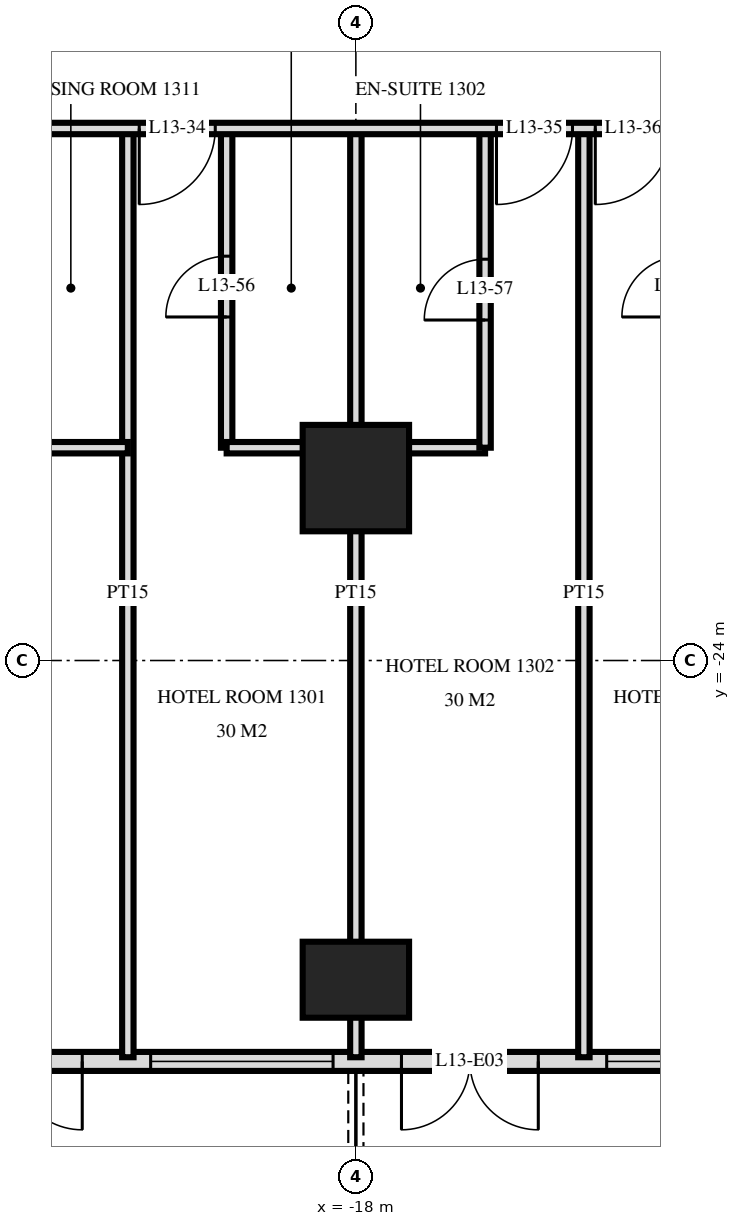
"""IFC4 building model, lengths in metres.
Left out: names, types, materials, properties, quantities, classifications, styles, units other than length and angle.
Written with IfcOpenShell. Run it as: python <this file> out.ifc"""

import sys

from ifc_helpers import new_model, si_unit, direction, frame, frame_2d, origin, origin_2d, place, context, subcontext, project, spatial, rectangle, extrude, element, fill, save


model = new_model("IFC4")
c1 = context("Model", 3, precision=1e-05, world=origin(), true_north=direction((0.0, 1.0)))
c2 = subcontext(c1, "Body", "Model", "MODEL_VIEW")
j1 = project(units=[si_unit("LENGTHUNIT", "METRE"), si_unit("PLANEANGLEUNIT", "RADIAN")], contexts=[c1])
p1 = place(None, origin())
s1 = spatial("IfcSite", under=j1, at=p1, CompositionType="ELEMENT")
p2 = place(p1, origin())
s2 = spatial("IfcBuilding", under=s1, at=p2, CompositionType="ELEMENT")
p3 = place(p2, frame((0.0, 0.0, 56.4)))
s3 = spatial("IfcBuildingStorey", under=s2, at=p3, CompositionType="ELEMENT", Elevation=56.4)
p4 = place(p3, frame((-18.0, -28.2, 0.0), z_axis=(0.0, 0.0, 1.0), x_axis=(1.0, 0.0, 0.0)))
e1 = element("IfcColumn", 1, at=p4, inside=s3, PredefinedType="COLUMN", context=c2, shape_type="SweptSolid", body=[
    extrude(rectangle(XDim=1.4, YDim=1.0, at=origin_2d()), origin(), (0.0, 0.0, 1.0), 3.6),
])
p5 = place(p3, frame((-18.0, -21.6, 0.0), z_axis=(0.0, 0.0, 1.0), x_axis=(1.0, 0.0, 0.0)))
e2 = element("IfcColumn", 2, at=p5, inside=s3, PredefinedType="COLUMN", context=c2, shape_type="SweptSolid", body=[
    extrude(rectangle(XDim=1.4, YDim=1.4, at=origin_2d()), origin(), (0.0, 0.0, 1.0), 3.6),
])
p6 = place(p3, frame((-28.775, -29.275, 0.0), z_axis=(0.0, 0.0, 1.0), x_axis=(1.0, 0.0, 0.0)))
e3 = element("IfcWall", 3, at=p6, inside=s3, PredefinedType="SOLIDWALL", context=c2, shape_type="SweptSolid", body=[
    extrude(rectangle(XDim=57.551, YDim=0.25, at=frame_2d((28.775, 0.0))), origin(), (0.0, 0.0, 1.0), 3.32),
])
p7 = place(p6, frame((0.575, 0.0, 0.0)))
e4 = element("IfcOpeningElement", 4, at=p7, cuts=e3, PredefinedType="OPENING", context=c2, shape_type="SweptSolid", body=[
    extrude(rectangle(XDim=1.8, YDim=2.4, at=frame_2d((0.9, 1.2))), frame((0.0, 0.135, 0.0), z_axis=(0.0, -1.0, 0.0), x_axis=(1.0, 0.0, 0.0)), (0.0, 0.0, 1.0), 0.27),
])
p8 = place(p6, frame((5.375, 0.0, 0.0)))
e5 = element("IfcOpeningElement", 5, at=p8, cuts=e3, PredefinedType="OPENING", context=c2, shape_type="SweptSolid", body=[
    extrude(rectangle(XDim=1.8, YDim=2.4, at=frame_2d((0.9, 1.2))), frame((0.0, 0.135, 0.0), z_axis=(0.0, -1.0, 0.0), x_axis=(1.0, 0.0, 0.0)), (0.0, 0.0, 1.0), 0.27),
])
p9 = place(p6, frame((8.075, 0.0, 0.3)))
e6 = element("IfcOpeningElement", 6, at=p9, cuts=e3, PredefinedType="OPENING", context=c2, shape_type="SweptSolid", body=[
    extrude(rectangle(XDim=2.4, YDim=2.1, at=frame_2d((1.2, 1.05))), frame((0.0, 0.135, 0.0), z_axis=(0.0, -1.0, 0.0), x_axis=(1.0, 0.0, 0.0)), (0.0, 0.0, 1.0), 0.27),
])
p10 = place(p6, frame((11.375, 0.0, 0.0)))
e7 = element("IfcOpeningElement", 7, at=p10, cuts=e3, PredefinedType="OPENING", context=c2, shape_type="SweptSolid", body=[
    extrude(rectangle(XDim=1.8, YDim=2.4, at=frame_2d((0.9, 1.2))), frame((0.0, 0.135, 0.0), z_axis=(0.0, -1.0, 0.0), x_axis=(1.0, 0.0, 0.0)), (0.0, 0.0, 1.0), 0.27),
])
p11 = place(p6, frame((14.075, 0.0, 0.3)))
e8 = element("IfcOpeningElement", 8, at=p11, cuts=e3, PredefinedType="OPENING", context=c2, shape_type="SweptSolid", body=[
    extrude(rectangle(XDim=2.4, YDim=2.1, at=frame_2d((1.2, 1.05))), frame((0.0, 0.135, 0.0), z_axis=(0.0, -1.0, 0.0), x_axis=(1.0, 0.0, 0.0)), (0.0, 0.0, 1.0), 0.27),
])
p12 = place(p6, frame((17.375, 0.0, 0.0)))
e9 = element("IfcOpeningElement", 9, at=p12, cuts=e3, PredefinedType="OPENING", context=c2, shape_type="SweptSolid", body=[
    extrude(rectangle(XDim=1.8, YDim=2.4, at=frame_2d((0.9, 1.2))), frame((0.0, 0.135, 0.0), z_axis=(0.0, -1.0, 0.0), x_axis=(1.0, 0.0, 0.0)), (0.0, 0.0, 1.0), 0.27),
])
p13 = place(p6, frame((20.075, 0.0, 0.3)))
e10 = element("IfcOpeningElement", 10, at=p13, cuts=e3, PredefinedType="OPENING", context=c2, shape_type="SweptSolid", body=[
    extrude(rectangle(XDim=2.4, YDim=2.1, at=frame_2d((1.2, 1.05))), frame((0.0, 0.135, 0.0), z_axis=(0.0, -1.0, 0.0), x_axis=(1.0, 0.0, 0.0)), (0.0, 0.0, 1.0), 0.27),
])
p14 = place(p6, frame((23.075, 0.0, 0.3)))
e11 = element("IfcOpeningElement", 11, at=p14, cuts=e3, PredefinedType="OPENING", context=c2, shape_type="SweptSolid", body=[
    extrude(rectangle(XDim=2.4, YDim=2.1, at=frame_2d((1.2, 1.05))), frame((0.0, 0.135, 0.0), z_axis=(0.0, -1.0, 0.0), x_axis=(1.0, 0.0, 0.0)), (0.0, 0.0, 1.0), 0.27),
])
p15 = place(p6, frame((26.375, 0.0, 0.0)))
e12 = element("IfcOpeningElement", 12, at=p15, cuts=e3, PredefinedType="OPENING", context=c2, shape_type="SweptSolid", body=[
    extrude(rectangle(XDim=1.8, YDim=2.4, at=frame_2d((0.9, 1.2))), frame((0.0, 0.135, 0.0), z_axis=(0.0, -1.0, 0.0), x_axis=(1.0, 0.0, 0.0)), (0.0, 0.0, 1.0), 0.27),
])
p16 = place(p6, frame((29.075, 0.0, 0.3)))
e13 = element("IfcOpeningElement", 13, at=p16, cuts=e3, PredefinedType="OPENING", context=c2, shape_type="SweptSolid", body=[
    extrude(rectangle(XDim=2.4, YDim=2.1, at=frame_2d((1.2, 1.05))), frame((0.0, 0.135, 0.0), z_axis=(0.0, -1.0, 0.0), x_axis=(1.0, 0.0, 0.0)), (0.0, 0.0, 1.0), 0.27),
])
p17 = place(p6, frame((32.375, 0.0, 0.0)))
e14 = element("IfcOpeningElement", 14, at=p17, cuts=e3, PredefinedType="OPENING", context=c2, shape_type="SweptSolid", body=[
    extrude(rectangle(XDim=1.8, YDim=2.4, at=frame_2d((0.9, 1.2))), frame((0.0, 0.135, 0.0), z_axis=(0.0, -1.0, 0.0), x_axis=(1.0, 0.0, 0.0)), (0.0, 0.0, 1.0), 0.27),
])
p18 = place(p6, frame((35.375, 0.0, 0.0)))
e15 = element("IfcOpeningElement", 15, at=p18, cuts=e3, PredefinedType="OPENING", context=c2, shape_type="SweptSolid", body=[
    extrude(rectangle(XDim=1.8, YDim=2.4, at=frame_2d((0.9, 1.2))), frame((0.0, 0.135, 0.0), z_axis=(0.0, -1.0, 0.0), x_axis=(1.0, 0.0, 0.0)), (0.0, 0.0, 1.0), 0.27),
])
p19 = place(p6, frame((38.075, 0.0, 0.3)))
e16 = element("IfcOpeningElement", 16, at=p19, cuts=e3, PredefinedType="OPENING", context=c2, shape_type="SweptSolid", body=[
    extrude(rectangle(XDim=2.4, YDim=2.1, at=frame_2d((1.2, 1.05))), frame((0.0, 0.135, 0.0), z_axis=(0.0, -1.0, 0.0), x_axis=(1.0, 0.0, 0.0)), (0.0, 0.0, 1.0), 0.27),
])
p20 = place(p6, frame((41.375, 0.0, 0.0)))
e17 = element("IfcOpeningElement", 17, at=p20, cuts=e3, PredefinedType="OPENING", context=c2, shape_type="SweptSolid", body=[
    extrude(rectangle(XDim=1.8, YDim=2.4, at=frame_2d((0.9, 1.2))), frame((0.0, 0.135, 0.0), z_axis=(0.0, -1.0, 0.0), x_axis=(1.0, 0.0, 0.0)), (0.0, 0.0, 1.0), 0.27),
])
p21 = place(p6, frame((44.075, 0.0, 0.3)))
e18 = element("IfcOpeningElement", 18, at=p21, cuts=e3, PredefinedType="OPENING", context=c2, shape_type="SweptSolid", body=[
    extrude(rectangle(XDim=2.4, YDim=2.1, at=frame_2d((1.2, 1.05))), frame((0.0, 0.135, 0.0), z_axis=(0.0, -1.0, 0.0), x_axis=(1.0, 0.0, 0.0)), (0.0, 0.0, 1.0), 0.27),
])
p22 = place(p6, frame((47.075, 0.0, 0.3)))
e19 = element("IfcOpeningElement", 19, at=p22, cuts=e3, PredefinedType="OPENING", context=c2, shape_type="SweptSolid", body=[
    extrude(rectangle(XDim=2.4, YDim=2.1, at=frame_2d((1.2, 1.05))), frame((0.0, 0.135, 0.0), z_axis=(0.0, -1.0, 0.0), x_axis=(1.0, 0.0, 0.0)), (0.0, 0.0, 1.0), 0.27),
])
p23 = place(p6, frame((50.375, 0.0, 0.0)))
e20 = element("IfcOpeningElement", 20, at=p23, cuts=e3, PredefinedType="OPENING", context=c2, shape_type="SweptSolid", body=[
    extrude(rectangle(XDim=1.8, YDim=2.4, at=frame_2d((0.9, 1.2))), frame((0.0, 0.135, 0.0), z_axis=(0.0, -1.0, 0.0), x_axis=(1.0, 0.0, 0.0)), (0.0, 0.0, 1.0), 0.27),
])
p24 = place(p6, frame((53.375, 0.0, 0.0)))
e21 = element("IfcOpeningElement", 21, at=p24, cuts=e3, PredefinedType="OPENING", context=c2, shape_type="SweptSolid", body=[
    extrude(rectangle(XDim=1.8, YDim=2.4, at=frame_2d((0.9, 1.2))), frame((0.0, 0.135, 0.0), z_axis=(0.0, -1.0, 0.0), x_axis=(1.0, 0.0, 0.0)), (0.0, 0.0, 1.0), 0.27),
])
p25 = place(p3, frame((-15.0, -29.22, 0.0), z_axis=(0.0, 0.0, 1.0), x_axis=(0.0, 1.0, 0.0)))
e22 = element("IfcWall", 22, at=p25, inside=s3, PredefinedType="PARTITIONING", context=c2, shape_type="SweptSolid", body=[
    extrude(rectangle(XDim=12.22, YDim=0.15, at=frame_2d((6.11, 0.0))), origin(), (0.0, 0.0, 1.0), 3.32),
])
p26 = place(p3, frame((-16.3, -21.2, 0.0), z_axis=(0.0, 0.0, 1.0), x_axis=(0.0, 1.0, 0.0)))
e23 = element("IfcWall", 23, at=p26, inside=s3, PredefinedType="PARTITIONING", context=c2, shape_type="SweptSolid", body=[
    extrude(rectangle(XDim=4.2, YDim=0.15, at=frame_2d((2.1, 0.0))), origin(), (0.0, 0.0, 1.0), 3.32),
])
p27 = place(p26, frame((1.68, 0.0, 0.0)))
e24 = element("IfcOpeningElement", 24, at=p27, cuts=e23, PredefinedType="OPENING", context=c2, shape_type="SweptSolid", body=[
    extrude(rectangle(XDim=0.8, YDim=2.1, at=frame_2d((0.4, 1.05))), frame((0.0, 0.085, 0.0), z_axis=(0.0, -1.0, 0.0), x_axis=(1.0, 0.0, 0.0)), (0.0, 0.0, 1.0), 0.17),
])
p28 = place(p3, frame((-18.0, -29.22, 0.0), z_axis=(0.0, 0.0, 1.0), x_axis=(0.0, 1.0, 0.0)))
e25 = element("IfcWall", 25, at=p28, inside=s3, PredefinedType="PARTITIONING", context=c2, shape_type="SweptSolid", body=[
    extrude(rectangle(XDim=12.22, YDim=0.15, at=frame_2d((6.11, 0.0))), origin(), (0.0, 0.0, 1.0), 3.32),
])
p29 = place(p3, frame((-19.7, -21.2, 0.0), z_axis=(0.0, 0.0, 1.0), x_axis=(0.0, 1.0, 0.0)))
e26 = element("IfcWall", 26, at=p29, inside=s3, PredefinedType="PARTITIONING", context=c2, shape_type="SweptSolid", body=[
    extrude(rectangle(XDim=4.2, YDim=0.15, at=frame_2d((2.1, 0.0))), origin(), (0.0, 0.0, 1.0), 3.32),
])
p30 = place(p29, frame((1.72, 0.0, 0.0)))
e27 = element("IfcOpeningElement", 27, at=p30, cuts=e26, PredefinedType="OPENING", context=c2, shape_type="SweptSolid", body=[
    extrude(rectangle(XDim=0.8, YDim=2.1, at=frame_2d((0.4, 1.05))), frame((0.0, 0.085, 0.0), z_axis=(0.0, -1.0, 0.0), x_axis=(1.0, 0.0, 0.0)), (0.0, 0.0, 1.0), 0.17),
])
p31 = place(p3, frame((-21.0, -29.22, 0.0), z_axis=(0.0, 0.0, 1.0), x_axis=(0.0, 1.0, 0.0)))
e28 = element("IfcWall", 28, at=p31, inside=s3, PredefinedType="PARTITIONING", context=c2, shape_type="SweptSolid", body=[
    extrude(rectangle(XDim=12.22, YDim=0.15, at=frame_2d((6.11, 0.0))), origin(), (0.0, 0.0, 1.0), 3.32),
])
p32 = place(p3, frame((-22.5, -21.2, 0.0), z_axis=(0.0, 0.0, 1.0), x_axis=(1.0, 0.0, 0.0)))
e29 = element("IfcWall", 29, at=p32, inside=s3, PredefinedType="PARTITIONING", context=c2, shape_type="SweptSolid", body=[
    extrude(rectangle(XDim=1.5, YDim=0.15, at=frame_2d((0.75, 0.0))), origin(), (0.0, 0.0, 1.0), 3.32),
])
p33 = place(p3, frame((-19.7, -21.2, 0.0), z_axis=(0.0, 0.0, 1.0), x_axis=(1.0, 0.0, 0.0)))
e30 = element("IfcWall", 30, at=p33, inside=s3, PredefinedType="PARTITIONING", context=c2, shape_type="SweptSolid", body=[
    extrude(rectangle(XDim=3.4, YDim=0.15, at=frame_2d((1.7, 0.0))), origin(), (0.0, 0.0, 1.0), 3.32),
])
p34 = place(p3, frame((-33.12, -17.0, 0.0), z_axis=(0.0, 0.0, 1.0), x_axis=(1.0, 0.0, 0.0)))
e31 = element("IfcWall", 31, at=p34, inside=s3, PredefinedType="PARTITIONING", context=c2, shape_type="SweptSolid", body=[
    extrude(rectangle(XDim=66.24, YDim=0.15, at=frame_2d((33.12, 0.0))), origin(), (0.0, 0.0, 1.0), 3.32),
])
p35 = place(p34, frame((12.27, 0.0, 0.0)))
e32 = element("IfcOpeningElement", 32, at=p35, cuts=e31, PredefinedType="OPENING", context=c2, shape_type="SweptSolid", body=[
    extrude(rectangle(XDim=1.0, YDim=2.1, at=frame_2d((0.5, 1.05))), frame((0.0, 0.085, 0.0), z_axis=(0.0, -1.0, 0.0), x_axis=(1.0, 0.0, 0.0)), (0.0, 0.0, 1.0), 0.17),
])
p36 = place(p34, frame((16.97, 0.0, 0.0)))
e33 = element("IfcOpeningElement", 33, at=p36, cuts=e31, PredefinedType="OPENING", context=c2, shape_type="SweptSolid", body=[
    extrude(rectangle(XDim=1.0, YDim=2.1, at=frame_2d((0.5, 1.05))), frame((0.0, 0.085, 0.0), z_axis=(0.0, -1.0, 0.0), x_axis=(1.0, 0.0, 0.0)), (0.0, 0.0, 1.0), 0.17),
])
p37 = place(p34, frame((18.27, 0.0, 0.0)))
e34 = element("IfcOpeningElement", 34, at=p37, cuts=e31, PredefinedType="OPENING", context=c2, shape_type="SweptSolid", body=[
    extrude(rectangle(XDim=1.0, YDim=2.1, at=frame_2d((0.5, 1.05))), frame((0.0, 0.085, 0.0), z_axis=(0.0, -1.0, 0.0), x_axis=(1.0, 0.0, 0.0)), (0.0, 0.0, 1.0), 0.17),
])
p38 = place(p34, frame((22.97, 0.0, 0.0)))
e35 = element("IfcOpeningElement", 35, at=p38, cuts=e31, PredefinedType="OPENING", context=c2, shape_type="SweptSolid", body=[
    extrude(rectangle(XDim=1.0, YDim=2.1, at=frame_2d((0.5, 1.05))), frame((0.0, 0.085, 0.0), z_axis=(0.0, -1.0, 0.0), x_axis=(1.0, 0.0, 0.0)), (0.0, 0.0, 1.0), 0.17),
])
p39 = place(p34, frame((24.27, 0.0, 0.0)))
e36 = element("IfcOpeningElement", 36, at=p39, cuts=e31, PredefinedType="OPENING", context=c2, shape_type="SweptSolid", body=[
    extrude(rectangle(XDim=1.0, YDim=2.1, at=frame_2d((0.5, 1.05))), frame((0.0, 0.085, 0.0), z_axis=(0.0, -1.0, 0.0), x_axis=(1.0, 0.0, 0.0)), (0.0, 0.0, 1.0), 0.17),
])
p40 = place(p34, frame((28.97, 0.0, 0.0)))
e37 = element("IfcOpeningElement", 37, at=p40, cuts=e31, PredefinedType="OPENING", context=c2, shape_type="SweptSolid", body=[
    extrude(rectangle(XDim=1.0, YDim=2.1, at=frame_2d((0.5, 1.05))), frame((0.0, 0.085, 0.0), z_axis=(0.0, -1.0, 0.0), x_axis=(1.0, 0.0, 0.0)), (0.0, 0.0, 1.0), 0.17),
])
p41 = place(p34, frame((30.27, 0.0, 0.0)))
e38 = element("IfcOpeningElement", 38, at=p41, cuts=e31, PredefinedType="OPENING", context=c2, shape_type="SweptSolid", body=[
    extrude(rectangle(XDim=1.0, YDim=2.1, at=frame_2d((0.5, 1.05))), frame((0.0, 0.085, 0.0), z_axis=(0.0, -1.0, 0.0), x_axis=(1.0, 0.0, 0.0)), (0.0, 0.0, 1.0), 0.17),
])
p42 = place(p34, frame((33.82, 0.0, 0.0)))
e39 = element("IfcOpeningElement", 39, at=p42, cuts=e31, PredefinedType="OPENING", context=c2, shape_type="SweptSolid", body=[
    extrude(rectangle(XDim=1.0, YDim=2.1, at=frame_2d((0.5, 1.05))), frame((0.0, 0.085, 0.0), z_axis=(0.0, -1.0, 0.0), x_axis=(1.0, 0.0, 0.0)), (0.0, 0.0, 1.0), 0.17),
])
p43 = place(p34, frame((46.27, 0.0, 0.0)))
e40 = element("IfcOpeningElement", 40, at=p43, cuts=e31, PredefinedType="OPENING", context=c2, shape_type="SweptSolid", body=[
    extrude(rectangle(XDim=1.0, YDim=2.1, at=frame_2d((0.5, 1.05))), frame((0.0, 0.085, 0.0), z_axis=(0.0, -1.0, 0.0), x_axis=(1.0, 0.0, 0.0)), (0.0, 0.0, 1.0), 0.17),
])
p44 = place(p34, frame((52.97, 0.0, 0.0)))
e41 = element("IfcOpeningElement", 41, at=p44, cuts=e31, PredefinedType="OPENING", context=c2, shape_type="SweptSolid", body=[
    extrude(rectangle(XDim=1.0, YDim=2.1, at=frame_2d((0.5, 1.05))), frame((0.0, 0.085, 0.0), z_axis=(0.0, -1.0, 0.0), x_axis=(1.0, 0.0, 0.0)), (0.0, 0.0, 1.0), 0.17),
])
p45 = place(p34, frame((6.05, 0.0, 0.0)))
e42 = element("IfcOpeningElement", 42, at=p45, cuts=e31, PredefinedType="OPENING", context=c2, shape_type="SweptSolid", body=[
    extrude(rectangle(XDim=1.0, YDim=2.1, at=frame_2d((0.5, 1.05))), frame((0.0, 0.085, 0.0), z_axis=(0.0, -1.0, 0.0), x_axis=(1.0, 0.0, 0.0)), (0.0, 0.0, 1.0), 0.17),
])
p46 = place(p34, frame((59.15, 0.0, 0.0)))
e43 = element("IfcOpeningElement", 43, at=p46, cuts=e31, PredefinedType="OPENING", context=c2, shape_type="SweptSolid", body=[
    extrude(rectangle(XDim=1.0, YDim=2.1, at=frame_2d((0.5, 1.05))), frame((0.0, 0.085, 0.0), z_axis=(0.0, -1.0, 0.0), x_axis=(1.0, 0.0, 0.0)), (0.0, 0.0, 1.0), 0.17),
])
p47 = place(p8, frame((0.9, 0.0, 0.0), z_axis=(0.0, 0.0, 1.0), x_axis=(-1.0, 0.0, 0.0)))
e44 = element("IfcDoor", 44, at=p47, inside=s3, OperationType="DOUBLE_DOOR_SINGLE_SWING", PredefinedType="DOOR", context=c2, shape_type="SweptSolid", body=[
    extrude(rectangle(XDim=1.8, YDim=2.4, at=frame_2d((0.0, 1.2))), frame((0.0, -0.025, 0.0), z_axis=(0.0, 1.0, 0.0), x_axis=(-1.0, 0.0, 0.0)), (0.0, 0.0, 1.0), 0.05),
])
fill(e5, e44)
p48 = place(p9, origin())
e45 = element("IfcWindow", 45, at=p48, inside=s3, PartitioningType="SINGLE_PANEL", PredefinedType="WINDOW", context=c2, shape_type="SweptSolid", body=[
    extrude(rectangle(XDim=2.4, YDim=2.1, at=frame_2d((1.2, 1.05))), frame((0.0, 0.03, 0.0), z_axis=(0.0, -1.0, 0.0), x_axis=(1.0, 0.0, 0.0)), (0.0, 0.0, 1.0), 0.06),
])
fill(e6, e45)
p49 = place(p10, frame((0.9, 0.0, 0.0), z_axis=(0.0, 0.0, 1.0), x_axis=(-1.0, 0.0, 0.0)))
e46 = element("IfcDoor", 46, at=p49, inside=s3, OperationType="DOUBLE_DOOR_SINGLE_SWING", PredefinedType="DOOR", context=c2, shape_type="SweptSolid", body=[
    extrude(rectangle(XDim=1.8, YDim=2.4, at=frame_2d((0.0, 1.2))), frame((0.0, -0.025, 0.0), z_axis=(0.0, 1.0, 0.0), x_axis=(-1.0, 0.0, 0.0)), (0.0, 0.0, 1.0), 0.05),
])
fill(e7, e46)
p50 = place(p11, origin())
e47 = element("IfcWindow", 47, at=p50, inside=s3, PartitioningType="SINGLE_PANEL", PredefinedType="WINDOW", context=c2, shape_type="SweptSolid", body=[
    extrude(rectangle(XDim=2.4, YDim=2.1, at=frame_2d((1.2, 1.05))), frame((0.0, 0.03, 0.0), z_axis=(0.0, -1.0, 0.0), x_axis=(1.0, 0.0, 0.0)), (0.0, 0.0, 1.0), 0.06),
])
fill(e8, e47)
p51 = place(p35, frame((0.5, 0.0, 0.0), z_axis=(0.0, 0.0, 1.0), x_axis=(-1.0, 0.0, 0.0)))
e48 = element("IfcDoor", 48, at=p51, inside=s3, OperationType="SINGLE_SWING_LEFT", PredefinedType="DOOR", context=c2, shape_type="SweptSolid", body=[
    extrude(rectangle(XDim=1.0, YDim=2.1, at=frame_2d((0.0, 1.05))), frame((0.0, -0.025, 0.0), z_axis=(0.0, 1.0, 0.0), x_axis=(-1.0, 0.0, 0.0)), (0.0, 0.0, 1.0), 0.05),
])
fill(e32, e48)
p52 = place(p36, frame((0.5, 0.0, 0.0), z_axis=(0.0, 0.0, 1.0), x_axis=(-1.0, 0.0, 0.0)))
e49 = element("IfcDoor", 49, at=p52, inside=s3, OperationType="SINGLE_SWING_LEFT", PredefinedType="DOOR", context=c2, shape_type="SweptSolid", body=[
    extrude(rectangle(XDim=1.0, YDim=2.1, at=frame_2d((0.0, 1.05))), frame((0.0, -0.025, 0.0), z_axis=(0.0, 1.0, 0.0), x_axis=(-1.0, 0.0, 0.0)), (0.0, 0.0, 1.0), 0.05),
])
fill(e33, e49)
p53 = place(p37, frame((0.5, 0.0, 0.0), z_axis=(0.0, 0.0, 1.0), x_axis=(-1.0, 0.0, 0.0)))
e50 = element("IfcDoor", 50, at=p53, inside=s3, OperationType="SINGLE_SWING_LEFT", PredefinedType="DOOR", context=c2, shape_type="SweptSolid", body=[
    extrude(rectangle(XDim=1.0, YDim=2.1, at=frame_2d((0.0, 1.05))), frame((0.0, -0.025, 0.0), z_axis=(0.0, 1.0, 0.0), x_axis=(-1.0, 0.0, 0.0)), (0.0, 0.0, 1.0), 0.05),
])
fill(e34, e50)
p54 = place(p30, origin())
e51 = element("IfcDoor", 51, at=p54, inside=s3, OperationType="SINGLE_SWING_RIGHT", PredefinedType="DOOR", context=c2, shape_type="SweptSolid", body=[
    extrude(rectangle(XDim=0.8, YDim=2.1, at=frame_2d((0.4, 1.05))), frame((0.0, 0.025, 0.0), z_axis=(0.0, -1.0, 0.0), x_axis=(1.0, 0.0, 0.0)), (0.0, 0.0, 1.0), 0.05),
])
fill(e27, e51)
p55 = place(p27, origin())
e52 = element("IfcDoor", 52, at=p55, inside=s3, OperationType="SINGLE_SWING_RIGHT", PredefinedType="DOOR", context=c2, shape_type="SweptSolid", body=[
    extrude(rectangle(XDim=0.8, YDim=2.1, at=frame_2d((0.4, 1.05))), frame((0.0, 0.025, 0.0), z_axis=(0.0, -1.0, 0.0), x_axis=(1.0, 0.0, 0.0)), (0.0, 0.0, 1.0), 0.05),
])
fill(e24, e52)
save(model, sys.argv[1])
